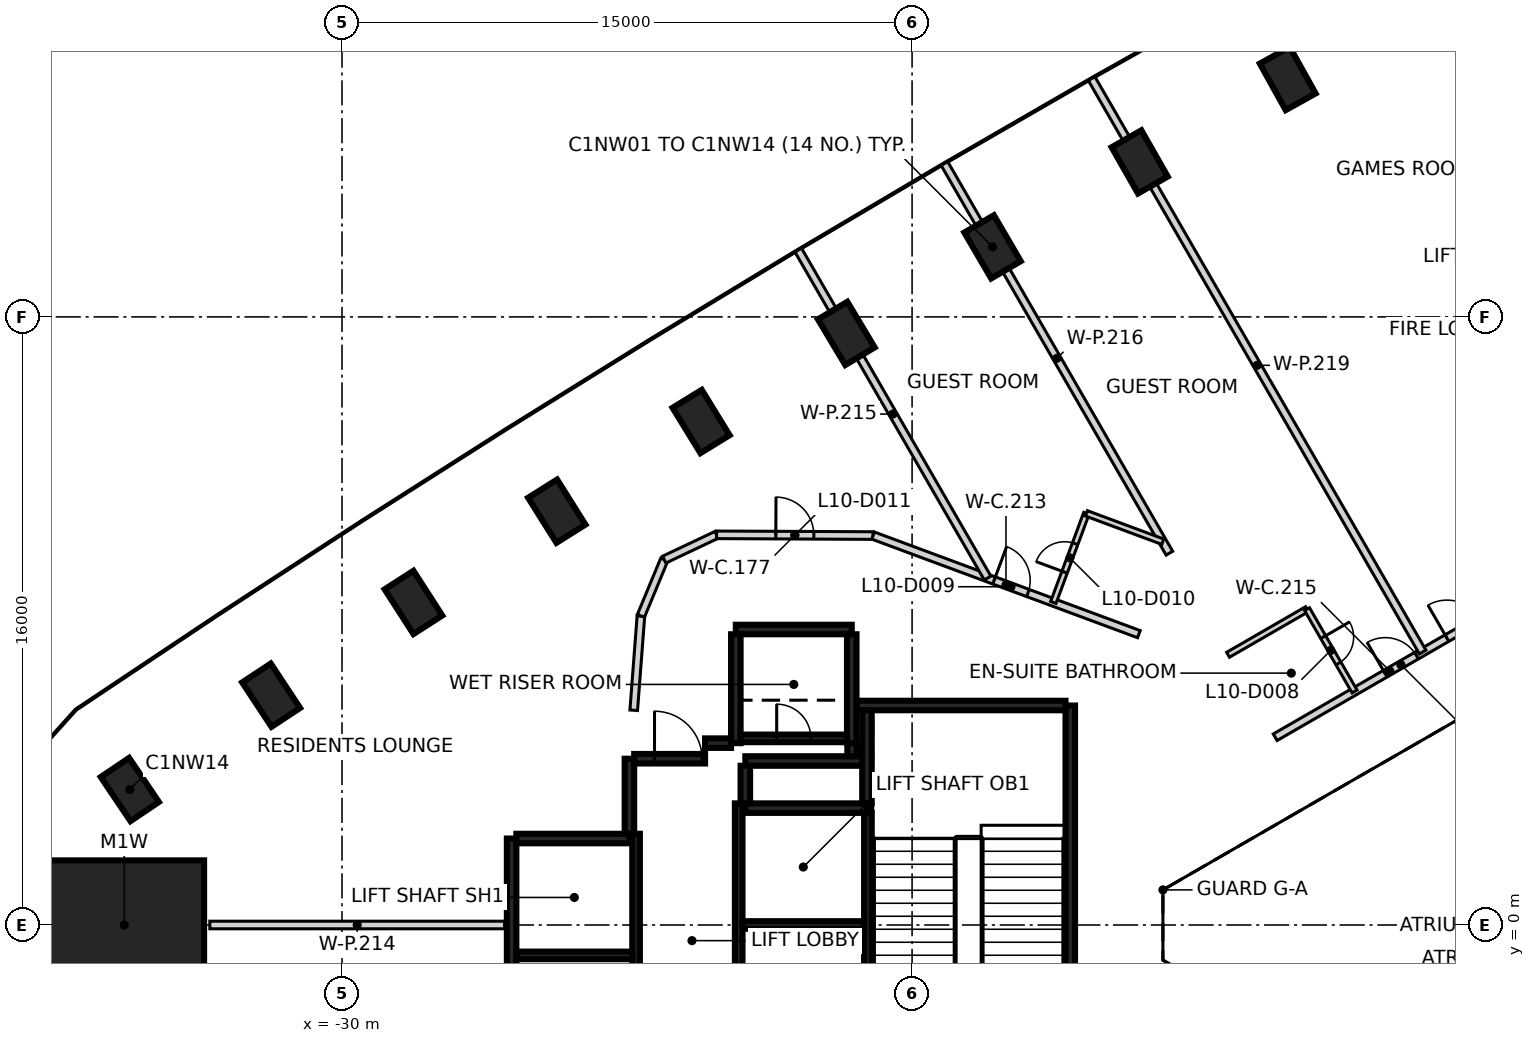
"""IFC4 building model, lengths in metres.
Left out: names, types, materials, properties, quantities, classifications, styles, units other than length and angle.
Written with IfcOpenShell. Run it as: python <this file> out.ifc"""

import sys

from ifc_helpers import new_model, si_unit, direction, frame, frame_2d, origin, origin_2d, place, context, subcontext, project, spatial, rectangle, extrude, element, fill, save


model = new_model("IFC4")
c1 = context("Model", 3, precision=1e-05, world=origin(), true_north=direction((0.0, 1.0)))
c2 = subcontext(c1, "Body", "Model", "MODEL_VIEW")
j1 = project(units=[si_unit("LENGTHUNIT", "METRE"), si_unit("PLANEANGLEUNIT", "RADIAN")], contexts=[c1])
p1 = place(None, origin())
s1 = spatial("IfcSite", under=j1, at=p1, CompositionType="ELEMENT")
p2 = place(p1, origin())
s2 = spatial("IfcBuilding", under=s1, at=p2, CompositionType="ELEMENT")
p3 = place(p2, frame((0.0, 0.0, 49.4)))
s3 = spatial("IfcBuildingStorey", under=s2, at=p3, CompositionType="ELEMENT", Elevation=49.4)
for number, where, z_axis, x_axis in (
    (1, (-5.116, 22.272, -0.475), (0.0, 0.0, 1.0), (-0.486, 0.874, 0.0)),
    (2, (-9.011, 20.079, -0.475), (0.0, 0.0, 1.0), (-0.495, 0.869, 0.0)),
    (3, (-12.883, 17.844, -0.475), (0.0, 0.0, 1.0), (-0.505, 0.863, 0.0)),
    (4, (-16.73, 15.566, -0.475), (0.0, 0.0, 1.0), (-0.514, 0.858, 0.0)),
    (5, (-20.552, 13.248, -0.475), (0.0, 0.0, 1.0), (-0.523, 0.852, 0.0)),
    (6, (-24.349, 10.888, -0.475), (0.0, 0.0, 1.0), (-0.532, 0.846, 0.0)),
    (7, (-28.12, 8.488, -0.475), (0.0, 0.0, 1.0), (-0.541, 0.841, 0.0)),
    (8, (-31.865, 6.046, -0.475), (0.0, 0.0, 1.0), (-0.551, 0.835, 0.0)),
    (9, (-35.583, 3.565, -0.475), (0.0, 0.0, 1.0), (-0.559, 0.829, 0.0)),
):
    element("IfcColumn", number, at=place(p3, frame(where, z_axis=z_axis, x_axis=x_axis)), inside=s3, PredefinedType="COLUMN", context=c2, shape_type="SweptSolid", body=[
        extrude(rectangle(XDim=1.4, YDim=0.9, at=origin_2d()), origin(), (0.0, 0.0, 1.0), 3.6),
    ])
p4 = place(p3, frame((-35.729, 0.0, -0.475), z_axis=(0.0, 0.0, 1.0), x_axis=(1.0, 0.0, 0.0)))
e10 = element("IfcColumn", 10, at=p4, inside=s3, PredefinedType="COLUMN", context=c2, shape_type="SweptSolid", body=[
    extrude(rectangle(XDim=4.2, YDim=3.4, at=origin_2d()), origin(), (0.0, 0.0, 1.0), 3.6),
])
p5 = place(p3, frame((-10.837, 5.775, 0.0), z_axis=(0.0, 0.0, 1.0), x_axis=(0.0, -1.0, 0.0)))
e11 = element("IfcWall", 11, at=p5, inside=s3, PredefinedType="SHEAR", context=c2, shape_type="SweptSolid", body=[
    extrude(rectangle(XDim=11.55, YDim=0.25, at=frame_2d((5.775, 0.0))), origin(), (0.0, 0.0, 1.0), 3.125),
])
p6 = place(p5, frame((10.025, 0.0, 0.0)))
e12 = element("IfcOpeningElement", 12, at=p6, cuts=e11, PredefinedType="OPENING", context=c2, shape_type="SweptSolid", body=[
    extrude(rectangle(XDim=1.2, YDim=2.1, at=frame_2d((0.6, 1.05))), frame((0.0, 0.135, 0.0), z_axis=(0.0, -1.0, 0.0), x_axis=(1.0, 0.0, 0.0)), (0.0, 0.0, 1.0), 0.27),
])
p7 = place(p5, frame((8.725, 0.0, 0.0)))
e13 = element("IfcOpeningElement", 13, at=p7, cuts=e11, PredefinedType="OPENING", context=c2, shape_type="SweptSolid", body=[
    extrude(rectangle(XDim=1.2, YDim=2.1, at=frame_2d((0.6, 1.05))), frame((0.0, 0.135, 0.0), z_axis=(0.0, -1.0, 0.0), x_axis=(1.0, 0.0, 0.0)), (0.0, 0.0, 1.0), 0.27),
])
p8 = place(p3, frame((-25.537, -3.575, 0.0), z_axis=(0.0, 0.0, 1.0), x_axis=(0.0, 1.0, 0.0)))
e14 = element("IfcWall", 14, at=p8, inside=s3, PredefinedType="SHEAR", context=c2, shape_type="SweptSolid", body=[
    extrude(rectangle(XDim=5.85, YDim=0.25, at=frame_2d((2.925, 0.0))), origin(), (0.0, 0.0, 1.0), 3.125),
])
p9 = place(p3, frame((-16.472, 5.775, 0.0), z_axis=(0.0, 0.0, 1.0), x_axis=(1.0, 0.0, 0.0)))
e15 = element("IfcWall", 15, at=p9, inside=s3, PredefinedType="SHEAR", context=c2, shape_type="SweptSolid", body=[
    extrude(rectangle(XDim=5.51, YDim=0.25, at=frame_2d((2.755, 0.0))), origin(), (0.0, 0.0, 1.0), 3.125),
])
p10 = place(p3, frame((-19.387, 3.075, 0.0), z_axis=(0.0, 0.0, 1.0), x_axis=(1.0, 0.0, 0.0)))
e16 = element("IfcWall", 16, at=p10, inside=s3, PredefinedType="SHEAR", context=c2, shape_type="SweptSolid", body=[
    extrude(rectangle(XDim=3.2, YDim=0.25, at=frame_2d((1.6, 0.0))), origin(), (0.0, 0.0, 1.0), 3.125),
])
p11 = place(p3, frame((-25.412, 2.275, 0.0), z_axis=(0.0, 0.0, 1.0), x_axis=(1.0, 0.0, 0.0)))
e17 = element("IfcWall", 17, at=p11, inside=s3, PredefinedType="SHEAR", context=c2, shape_type="SweptSolid", body=[
    extrude(rectangle(XDim=2.975, YDim=0.25, at=frame_2d((1.487, 0.0))), origin(), (0.0, 0.0, 1.0), 3.125),
])
p12 = place(p3, frame((-19.637, 7.775, 0.0), z_axis=(0.0, 0.0, 1.0), x_axis=(1.0, 0.0, 0.0)))
e18 = element("IfcWall", 18, at=p12, inside=s3, PredefinedType="SHEAR", context=c2, shape_type="SweptSolid", body=[
    extrude(rectangle(XDim=3.05, YDim=0.25, at=frame_2d((1.525, 0.0))), origin(), (0.0, 0.0, 1.0), 3.125),
])
for number, where, z_axis, x_axis in (
    (19, (-16.587, 7.65, 0.0), (0.0, 0.0, 1.0), (0.0, -1.0, 0.0)),
    (20, (-19.637, 4.785, 0.0), (0.0, 0.0, 1.0), (0.0, 1.0, 0.0)),
):
    element("IfcWall", number, at=place(p3, frame(where, z_axis=z_axis, x_axis=x_axis)), inside=s3, PredefinedType="SHEAR", context=c2, shape_type="SweptSolid", body=[
        extrude(rectangle(XDim=2.865, YDim=0.25, at=frame_2d((1.432, 0.0))), origin(), (0.0, 0.0, 1.0), 3.125),
    ])
p13 = place(p3, frame((-16.302, 4.315, 0.0), z_axis=(0.0, 0.0, 1.0), x_axis=(-1.0, 0.0, 0.0)))
e21 = element("IfcWall", 21, at=p13, inside=s3, PredefinedType="SHEAR", context=c2, shape_type="SweptSolid", body=[
    extrude(rectangle(XDim=3.085, YDim=0.25, at=frame_2d((1.542, 0.0))), origin(), (0.0, 0.0, 1.0), 3.125),
])
p14 = place(p3, frame((-16.187, 3.2, 0.0), z_axis=(0.0, 0.0, 1.0), x_axis=(0.0, 1.0, 0.0)))
e22 = element("IfcWall", 22, at=p14, inside=s3, PredefinedType="SHEAR", context=c2, shape_type="SweptSolid", body=[
    extrude(rectangle(XDim=2.449, YDim=0.25, at=frame_2d((1.225, 0.0))), origin(), (0.0, 0.0, 1.0), 3.125),
])
p15 = place(p3, frame((-22.437, 2.4, 0.0), z_axis=(0.0, 0.0, 1.0), x_axis=(0.0, 1.0, 0.0)))
e23 = element("IfcWall", 23, at=p15, inside=s3, PredefinedType="SHEAR", context=c2, shape_type="SweptSolid", body=[
    extrude(rectangle(XDim=1.975, YDim=0.25, at=frame_2d((0.987, 0.0))), origin(), (0.0, 0.0, 1.0), 3.125),
])
p16 = place(p3, frame((-22.312, 4.375, 0.0), z_axis=(0.0, 0.0, 1.0), x_axis=(1.0, 0.0, 0.0)))
e24 = element("IfcWall", 24, at=p16, inside=s3, PredefinedType="SHEAR", context=c2, shape_type="SweptSolid", body=[
    extrude(rectangle(XDim=1.865, YDim=0.25, at=frame_2d((0.932, 0.0))), origin(), (0.0, 0.0, 1.0), 3.125),
])
p17 = place(p16, frame((0.535, 0.0, 0.0)))
e25 = element("IfcOpeningElement", 25, at=p17, cuts=e24, PredefinedType="OPENING", context=c2, shape_type="SweptSolid", body=[
    extrude(rectangle(XDim=1.25, YDim=2.1, at=frame_2d((0.625, 1.05))), frame((0.0, 0.135, 0.0), z_axis=(0.0, -1.0, 0.0), x_axis=(1.0, 0.0, 0.0)), (0.0, 0.0, 1.0), 0.27),
])
p18 = place(p3, frame((-19.387, 4.19, 0.0), z_axis=(0.0, 0.0, 1.0), x_axis=(0.0, -1.0, 0.0)))
e26 = element("IfcWall", 26, at=p18, inside=s3, PredefinedType="SHEAR", context=c2, shape_type="SweptSolid", body=[
    extrude(rectangle(XDim=0.989, YDim=0.25, at=frame_2d((0.495, 0.0))), origin(), (0.0, 0.0, 1.0), 3.125),
])
p19 = place(p3, frame((-20.447, 4.785, 0.0), z_axis=(0.0, 0.0, 1.0), x_axis=(1.0, 0.0, 0.0)))
e27 = element("IfcWall", 27, at=p19, inside=s3, PredefinedType="SHEAR", context=c2, shape_type="SweptSolid", body=[
    extrude(rectangle(XDim=0.685, YDim=0.25, at=frame_2d((0.342, 0.0))), origin(), (0.0, 0.0, 1.0), 3.125),
])
p20 = place(p3, frame((-16.577, 4.785, 0.0), z_axis=(0.0, 0.0, 1.0), x_axis=(0.0, -1.0, 0.0)))
e28 = element("IfcWall", 28, at=p20, inside=s3, PredefinedType="SHEAR", context=c2, shape_type="SweptSolid", body=[
    extrude(rectangle(XDim=0.344, YDim=0.25, at=frame_2d((0.172, 0.0))), origin(), (0.0, 0.0, 1.0), 3.125),
])
p21 = place(p3, frame((-16.162, 2.951, 0.0), z_axis=(0.0, 0.0, 1.0), x_axis=(0.0, -1.0, 0.0)))
e29 = element("IfcWall", 29, at=p21, inside=s3, PredefinedType="SHEAR", context=c2, shape_type="SweptSolid", body=[
    extrude(rectangle(XDim=5.851, YDim=0.2, at=frame_2d((2.925, 0.0))), origin(), (0.0, 0.0, 1.0), 3.125),
])
for number, where, z_axis, x_axis in (
    (30, (-19.562, -2.9, 0.0), (0.0, 0.0, 1.0), (0.0, 1.0, 0.0)),
    (31, (-22.262, 2.4, 0.0), (0.0, 0.0, 1.0), (0.0, -1.0, 0.0)),
):
    element("IfcWall", number, at=place(p3, frame(where, z_axis=z_axis, x_axis=x_axis)), inside=s3, PredefinedType="SHEAR", context=c2, shape_type="SweptSolid", body=[
        extrude(rectangle(XDim=6.1, YDim=0.2, at=frame_2d((3.05, 0.0))), origin(), (0.0, 0.0, 1.0), 3.125),
    ])
p22 = place(p3, frame((-16.263, 0.0, 0.0), z_axis=(0.0, 0.0, 1.0), x_axis=(-1.0, 0.0, 0.0)))
e32 = element("IfcWall", 32, at=p22, inside=s3, PredefinedType="SHEAR", context=c2, shape_type="SweptSolid", body=[
    extrude(rectangle(XDim=3.198, YDim=0.2, at=frame_2d((1.599, 0.0))), origin(), (0.0, 0.0, 1.0), 3.125),
])
p23 = place(p3, frame((-22.363, -0.8, 0.0), z_axis=(0.0, 0.0, 1.0), x_axis=(-1.0, 0.0, 0.0)))
e33 = element("IfcWall", 33, at=p23, inside=s3, PredefinedType="SHEAR", context=c2, shape_type="SweptSolid", body=[
    extrude(rectangle(XDim=3.048, YDim=0.2, at=frame_2d((1.524, 0.0))), origin(), (0.0, 0.0, 1.0), 3.125),
])
p24 = place(p3, frame((-19.511, 4.91, 0.0), z_axis=(0.0, 0.0, 1.0), x_axis=(1.0, 0.0, 0.0)))
e34 = element("IfcWall", 34, at=p24, inside=s3, PredefinedType="SHEAR", context=c2, shape_type="SweptSolid", body=[
    extrude(rectangle(XDim=2.798, YDim=0.2, at=frame_2d((1.399, 0.0))), origin(), (0.0, 0.0, 1.0), 3.125),
])
p25 = place(p24, frame((0.949, 0.0, 0.0)))
e35 = element("IfcOpeningElement", 35, at=p25, cuts=e34, PredefinedType="OPENING", context=c2, shape_type="SweptSolid", body=[
    extrude(rectangle(XDim=0.9, YDim=2.1, at=frame_2d((0.45, 1.05))), frame((0.0, 0.11, 0.0), z_axis=(0.0, -1.0, 0.0), x_axis=(1.0, 0.0, 0.0)), (0.0, 0.0, 1.0), 0.22),
])
p26 = place(p3, frame((-22.135, 8.13, 0.0), z_axis=(0.0, 0.0, 1.0), x_axis=(-0.076073461031, -0.997102215686, 0.0)))
e36 = element("IfcWall", 36, at=p26, inside=s3, PredefinedType="PARTITIONING", context=c2, shape_type="SweptSolid", body=[
    extrude(rectangle(XDim=2.487, YDim=0.2, at=frame_2d((1.244, 0.0))), origin(), (0.0, 0.0, 1.0), 3.125),
])
p27 = place(p3, frame((-22.135, 8.134, 0.0), z_axis=(0.0, 0.0, 1.0), x_axis=(0.383208453534, 0.923661886807, 0.0)))
e37 = element("IfcWall", 37, at=p27, inside=s3, PredefinedType="PARTITIONING", context=c2, shape_type="SweptSolid", body=[
    extrude(rectangle(XDim=1.602, YDim=0.2, at=frame_2d((0.801, 0.0))), origin(), (0.0, 0.0, 1.0), 3.125),
])
p28 = place(p3, frame((-21.521, 9.614, 0.0), z_axis=(0.0, 0.0, 1.0), x_axis=(0.904083527367, 0.427355795028, 0.0)))
e38 = element("IfcWall", 38, at=p28, inside=s3, PredefinedType="PARTITIONING", context=c2, shape_type="SweptSolid", body=[
    extrude(rectangle(XDim=1.523, YDim=0.2, at=frame_2d((0.761, 0.0))), origin(), (0.0, 0.0, 1.0), 3.125),
])
p29 = place(p3, frame((-20.143, 10.266, 0.0), z_axis=(0.0, 0.0, 1.0), x_axis=(0.999989297417, -0.004626559416, 0.0)))
e39 = element("IfcWall", 39, at=p29, inside=s3, PredefinedType="PARTITIONING", context=c2, shape_type="SweptSolid", body=[
    extrude(rectangle(XDim=4.116, YDim=0.2, at=frame_2d((2.058, 0.0))), origin(), (0.0, 0.0, 1.0), 3.125),
])
p30 = place(p29, frame((1.558, 0.0, 0.0)))
e40 = element("IfcOpeningElement", 40, at=p30, cuts=e39, PredefinedType="OPENING", context=c2, shape_type="SweptSolid", body=[
    extrude(rectangle(XDim=1.0, YDim=2.1, at=frame_2d((0.5, 1.05))), frame((0.0, 0.11, 0.0), z_axis=(0.0, -1.0, 0.0), x_axis=(1.0, 0.0, 0.0)), (0.0, 0.0, 1.0), 0.22),
])
p31 = place(p3, frame((-16.026, 10.246, 0.0), z_axis=(0.0, 0.0, 1.0), x_axis=(0.937598236139, -0.347720502112, 0.0)))
e41 = element("IfcWall", 41, at=p31, inside=s3, PredefinedType="PARTITIONING", context=c2, shape_type="SweptSolid", body=[
    extrude(rectangle(XDim=7.458, YDim=0.2, at=frame_2d((3.729, 0.0))), origin(), (0.0, 0.0, 1.0), 3.125),
])
p32 = place(p31, frame((3.396, 0.0, 0.0)))
e42 = element("IfcOpeningElement", 42, at=p32, cuts=e41, PredefinedType="OPENING", context=c2, shape_type="SweptSolid", body=[
    extrude(rectangle(XDim=0.95, YDim=2.1, at=frame_2d((0.475, 1.05))), frame((0.0, 0.11, 0.0), z_axis=(0.0, -1.0, 0.0), x_axis=(1.0, 0.0, 0.0)), (0.0, 0.0, 1.0), 0.22),
])
p33 = place(p3, frame((-5.446, 4.94, 0.0), z_axis=(0.0, 0.0, 1.0), x_axis=(0.866096332545, 0.499877127655, 0.0)))
e43 = element("IfcWall", 43, at=p33, inside=s3, PredefinedType="PARTITIONING", context=c2, shape_type="SweptSolid", body=[
    extrude(rectangle(XDim=6.969, YDim=0.2, at=frame_2d((3.484, 0.0))), origin(), (0.0, 0.0, 1.0), 3.125),
])
p34 = place(p33, frame((5.219, 0.0, 0.0)))
e44 = element("IfcOpeningElement", 44, at=p34, cuts=e43, PredefinedType="OPENING", context=c2, shape_type="SweptSolid", body=[
    extrude(rectangle(XDim=1.0, YDim=2.1, at=frame_2d((0.5, 1.05))), frame((0.0, 0.11, 0.0), z_axis=(0.0, -1.0, 0.0), x_axis=(1.0, 0.0, 0.0)), (0.0, 0.0, 1.0), 0.22),
])
p35 = place(p33, frame((3.344, 0.0, 0.0)))
e45 = element("IfcOpeningElement", 45, at=p35, cuts=e43, PredefinedType="OPENING", context=c2, shape_type="SweptSolid", body=[
    extrude(rectangle(XDim=0.95, YDim=2.1, at=frame_2d((0.475, 1.05))), frame((0.0, 0.11, 0.0), z_axis=(0.0, -1.0, 0.0), x_axis=(1.0, 0.0, 0.0)), (0.0, 0.0, 1.0), 0.22),
])
p36 = place(p3, frame((-33.478, 0.0, 0.0), z_axis=(0.0, 0.0, 1.0), x_axis=(1.0, 0.0, 0.0)))
e46 = element("IfcWall", 46, at=p36, inside=s3, PredefinedType="PARTITIONING", context=c2, shape_type="SweptSolid", body=[
    extrude(rectangle(XDim=7.756, YDim=0.2, at=frame_2d((3.878, 0.0))), origin(), (0.0, 0.0, 1.0), 3.125),
])
p37 = place(p3, frame((-17.996, 17.758, 0.0), z_axis=(0.0, 0.0, 1.0), x_axis=(0.500046945013, -0.865998298372, 0.0)))
e47 = element("IfcWall", 47, at=p37, inside=s3, PredefinedType="PARTITIONING", context=c2, shape_type="SweptSolid", body=[
    extrude(rectangle(XDim=9.964, YDim=0.2, at=frame_2d((4.982, 0.0))), origin(), (0.0, 0.0, 1.0), 3.125),
])
p38 = place(p3, frame((-14.149, 20.035, 0.0), z_axis=(0.0, 0.0, 1.0), x_axis=(0.500022967158, -0.866012143284, 0.0)))
e48 = element("IfcWall", 48, at=p38, inside=s3, PredefinedType="PARTITIONING", context=c2, shape_type="SweptSolid", body=[
    extrude(rectangle(XDim=11.838, YDim=0.2, at=frame_2d((5.919, 0.0))), origin(), (0.0, 0.0, 1.0), 3.125),
])
p39 = place(p3, frame((-10.276, 22.271, 0.0), z_axis=(0.0, 0.0, 1.0), x_axis=(0.499958184216, -0.866049544793, 0.0)))
e49 = element("IfcWall", 49, at=p39, inside=s3, PredefinedType="PARTITIONING", context=c2, shape_type="SweptSolid", body=[
    extrude(rectangle(XDim=17.422, YDim=0.2, at=frame_2d((8.711, 0.0))), origin(), (0.0, 0.0, 1.0), 3.125),
])
p40 = place(p3, frame((-11.283, 8.487, 0.0), z_axis=(0.0, 0.0, 1.0), x_axis=(0.347921729873, 0.937523583641, 0.0)))
e50 = element("IfcWall", 50, at=p40, inside=s3, PredefinedType="PARTITIONING", context=c2, shape_type="SweptSolid", body=[
    extrude(rectangle(XDim=2.5, YDim=0.15, at=frame_2d((1.25, 0.0))), origin(), (0.0, 0.0, 1.0), 3.125),
])
p41 = place(p40, frame((0.85, 0.0, 0.0)))
e51 = element("IfcOpeningElement", 51, at=p41, cuts=e50, PredefinedType="OPENING", context=c2, shape_type="SweptSolid", body=[
    extrude(rectangle(XDim=0.8, YDim=2.1, at=frame_2d((0.4, 1.05))), frame((0.0, 0.085, 0.0), z_axis=(0.0, -1.0, 0.0), x_axis=(1.0, 0.0, 0.0)), (0.0, 0.0, 1.0), 0.17),
])
p42 = place(p3, frame((-10.413, 10.831, 0.0), z_axis=(0.0, 0.0, 1.0), x_axis=(0.937443331153, -0.348137904971, 0.0)))
e52 = element("IfcWall", 52, at=p42, inside=s3, PredefinedType="PARTITIONING", context=c2, shape_type="SweptSolid", body=[
    extrude(rectangle(XDim=2.143, YDim=0.15, at=frame_2d((1.072, 0.0))), origin(), (0.0, 0.0, 1.0), 3.125),
])
p43 = place(p3, frame((-6.686, 7.11, 0.0), z_axis=(0.0, 0.0, 1.0), x_axis=(0.866100915363, 0.499869187296, 0.0)))
e53 = element("IfcWall", 53, at=p43, inside=s3, PredefinedType="PARTITIONING", context=c2, shape_type="SweptSolid", body=[
    extrude(rectangle(XDim=2.401, YDim=0.15, at=frame_2d((1.2, 0.0))), origin(), (0.0, 0.0, 1.0), 3.125),
])
p44 = place(p3, frame((-4.607, 8.31, 0.0), z_axis=(0.0, 0.0, 1.0), x_axis=(0.500004234368, -0.866022959057, 0.0)))
e54 = element("IfcWall", 54, at=p44, inside=s3, PredefinedType="PARTITIONING", context=c2, shape_type="SweptSolid", body=[
    extrude(rectangle(XDim=2.5, YDim=0.15, at=frame_2d((1.25, 0.0))), origin(), (0.0, 0.0, 1.0), 3.125),
])
p45 = place(p44, frame((0.85, 0.0, 0.0)))
e55 = element("IfcOpeningElement", 55, at=p45, cuts=e54, PredefinedType="OPENING", context=c2, shape_type="SweptSolid", body=[
    extrude(rectangle(XDim=0.8, YDim=2.1, at=frame_2d((0.4, 1.05))), frame((0.0, 0.085, 0.0), z_axis=(0.0, -1.0, 0.0), x_axis=(1.0, 0.0, 0.0)), (0.0, 0.0, 1.0), 0.17),
])
p46 = place(p17, origin())
e56 = element("IfcDoor", 56, at=p46, inside=s3, OperationType="SINGLE_SWING_LEFT", PredefinedType="DOOR", context=c2, shape_type="SweptSolid", body=[
    extrude(rectangle(XDim=1.25, YDim=2.1, at=frame_2d((0.625, 1.05))), frame((0.0, 0.025, 0.0), z_axis=(0.0, -1.0, 0.0), x_axis=(1.0, 0.0, 0.0)), (0.0, 0.0, 1.0), 0.05),
])
fill(e25, e56)
p47 = place(p25, origin())
e57 = element("IfcDoor", 57, at=p47, inside=s3, OperationType="SINGLE_SWING_LEFT", PredefinedType="DOOR", context=c2, shape_type="SweptSolid", body=[
    extrude(rectangle(XDim=0.9, YDim=2.1, at=frame_2d((0.45, 1.05))), frame((0.0, 0.025, 0.0), z_axis=(0.0, -1.0, 0.0), x_axis=(1.0, 0.0, 0.0)), (0.0, 0.0, 1.0), 0.05),
])
fill(e35, e57)
p48 = place(p34, origin())
e58 = element("IfcDoor", 58, at=p48, inside=s3, OperationType="SINGLE_SWING_LEFT", PredefinedType="DOOR", context=c2, shape_type="SweptSolid", body=[
    extrude(rectangle(XDim=1.0, YDim=2.1, at=frame_2d((0.5, 1.05))), frame((0.0, 0.025, 0.0), z_axis=(0.0, -1.0, 0.0), x_axis=(1.0, 0.0, 0.0)), (0.0, 0.0, 1.0), 0.05),
])
fill(e44, e58)
p49 = place(p35, origin())
e59 = element("IfcDoor", 59, at=p49, inside=s3, OperationType="SINGLE_SWING_LEFT", PredefinedType="DOOR", context=c2, shape_type="SweptSolid", body=[
    extrude(rectangle(XDim=0.95, YDim=2.1, at=frame_2d((0.475, 1.05))), frame((0.0, 0.025, 0.0), z_axis=(0.0, -1.0, 0.0), x_axis=(1.0, 0.0, 0.0)), (0.0, 0.0, 1.0), 0.05),
])
fill(e45, e59)
p50 = place(p45, frame((0.8, 0.0, 0.0), z_axis=(0.0, 0.0, 1.0), x_axis=(-1.0, 0.0, 0.0)))
e60 = element("IfcDoor", 60, at=p50, inside=s3, OperationType="SINGLE_SWING_LEFT", PredefinedType="DOOR", context=c2, shape_type="SweptSolid", body=[
    extrude(rectangle(XDim=0.8, YDim=2.1, at=frame_2d((0.4, 1.05))), frame((0.0, 0.025, 0.0), z_axis=(0.0, -1.0, 0.0), x_axis=(1.0, 0.0, 0.0)), (0.0, 0.0, 1.0), 0.05),
])
fill(e55, e60)
p51 = place(p32, origin())
e61 = element("IfcDoor", 61, at=p51, inside=s3, OperationType="SINGLE_SWING_LEFT", PredefinedType="DOOR", context=c2, shape_type="SweptSolid", body=[
    extrude(rectangle(XDim=0.95, YDim=2.1, at=frame_2d((0.475, 1.05))), frame((0.0, 0.025, 0.0), z_axis=(0.0, -1.0, 0.0), x_axis=(1.0, 0.0, 0.0)), (0.0, 0.0, 1.0), 0.05),
])
fill(e42, e61)
p52 = place(p41, origin())
e62 = element("IfcDoor", 62, at=p52, inside=s3, OperationType="SINGLE_SWING_LEFT", PredefinedType="DOOR", context=c2, shape_type="SweptSolid", body=[
    extrude(rectangle(XDim=0.8, YDim=2.1, at=frame_2d((0.4, 1.05))), frame((0.0, 0.025, 0.0), z_axis=(0.0, -1.0, 0.0), x_axis=(1.0, 0.0, 0.0)), (0.0, 0.0, 1.0), 0.05),
])
fill(e51, e62)
p53 = place(p30, frame((1.0, 0.0, 0.0), z_axis=(0.0, 0.0, 1.0), x_axis=(-1.0, 0.0, 0.0)))
e63 = element("IfcDoor", 63, at=p53, inside=s3, OperationType="SINGLE_SWING_LEFT", PredefinedType="DOOR", context=c2, shape_type="SweptSolid", body=[
    extrude(rectangle(XDim=1.0, YDim=2.1, at=frame_2d((0.5, 1.05))), frame((0.0, 0.025, 0.0), z_axis=(0.0, -1.0, 0.0), x_axis=(1.0, 0.0, 0.0)), (0.0, 0.0, 1.0), 0.05),
])
fill(e40, e63)
save(model, sys.argv[1])
